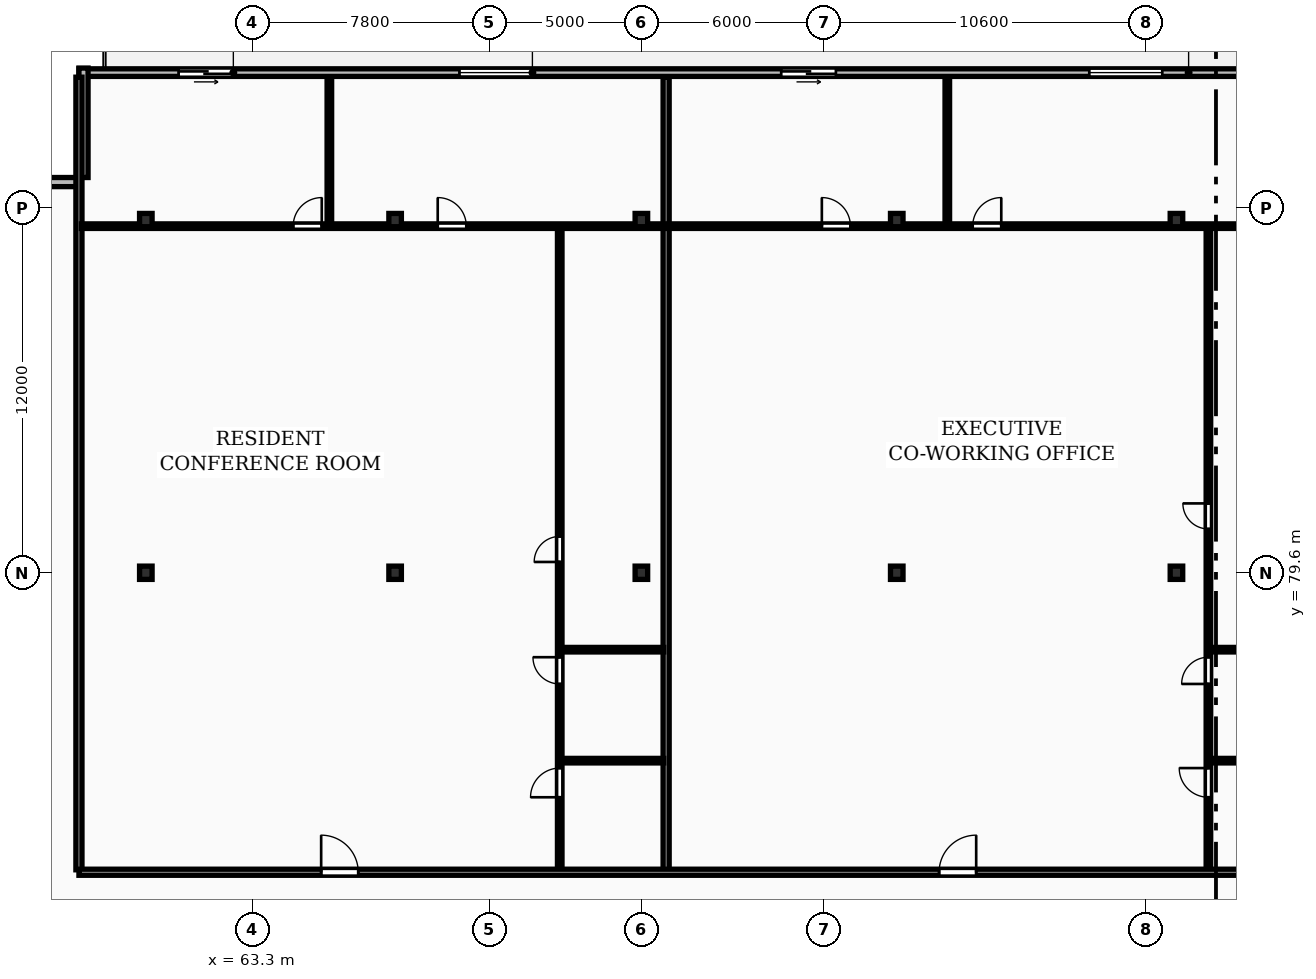
"""IFC4 building model, lengths in metres.
Left out: names, types, materials, properties, quantities, classifications, styles, units other than length and angle.
Written with IfcOpenShell. Run it as: python <this file> out.ifc"""

import sys

from ifc_helpers import new_model, si_unit, direction, frame, frame_2d, origin, origin_2d, place, context, subcontext, project, spatial, rectangle, i_section, extrude, element, fill, save


model = new_model("IFC4")
c1 = context("Model", 3, precision=1e-05, world=origin(), true_north=direction((0.0, 1.0)))
c2 = subcontext(c1, "Body", "Model", "MODEL_VIEW")
j1 = project(units=[si_unit("LENGTHUNIT", "METRE"), si_unit("PLANEANGLEUNIT", "RADIAN")], contexts=[c1])
p1 = place(None, origin())
s1 = spatial("IfcSite", under=j1, at=p1, CompositionType="ELEMENT")
p2 = place(p1, origin())
s2 = spatial("IfcBuilding", under=s1, at=p2, CompositionType="ELEMENT")
p3 = place(p2, frame((0.0, 0.0, 146.5)))
s3 = spatial("IfcBuildingStorey", under=s2, at=p3, CompositionType="ELEMENT", Elevation=146.5)
for number, where, z_axis, x_axis in (
    (1, (59.8, 79.6, 0.0), (0.0, 0.0, 1.0), (1.0, 0.0, 0.0)),
    (2, (59.8, 91.2, 0.0), (0.0, 0.0, 1.0), (1.0, 0.0, 0.0)),
    (3, (68.0, 79.6, 0.0), (0.0, 0.0, 1.0), (1.0, 0.0, 0.0)),
    (4, (68.0, 91.2, 0.0), (0.0, 0.0, 1.0), (1.0, 0.0, 0.0)),
    (5, (76.1, 79.6, 0.0), (0.0, 0.0, 1.0), (1.0, 0.0, 0.0)),
    (6, (76.1, 91.2, 0.0), (0.0, 0.0, 1.0), (1.0, 0.0, 0.0)),
    (7, (84.5, 79.6, 0.0), (0.0, 0.0, 1.0), (1.0, 0.0, 0.0)),
    (8, (84.5, 91.2, 0.0), (0.0, 0.0, 1.0), (1.0, 0.0, 0.0)),
    (9, (93.7, 79.6, 0.0), (0.0, 0.0, 1.0), (1.0, 0.0, 0.0)),
    (10, (93.7, 91.2, 0.0), (0.0, 0.0, 1.0), (1.0, 0.0, 0.0)),
):
    element("IfcColumn", number, at=place(p3, frame(where, z_axis=z_axis, x_axis=x_axis)), inside=s3, PredefinedType="COLUMN", context=c2, shape_type="SweptSolid", body=[
        extrude(i_section(OverallWidth=0.412, OverallDepth=0.437, WebThickness=0.036, FlangeThickness=0.052, FilletRadius=0.015, at=origin_2d()), origin(), (0.0, 0.0, 1.0), 3.6),
    ])
p4 = place(p3, frame((130.6, 96.05, 0.0), z_axis=(0.0, 0.0, 1.0), x_axis=(-1.0, 0.0, 0.0)))
e11 = element("IfcWall", 11, at=p4, inside=s3, PredefinedType="STANDARD", context=c2, shape_type="SweptSolid", body=[
    extrude(rectangle(XDim=73.0, YDim=0.25, at=frame_2d((36.5, 0.0))), origin(), (0.0, 0.0, 1.0), 3.31),
])
p5 = place(p4, frame((67.921, 0.0, 0.0)))
e12 = element("IfcOpeningElement", 12, at=p5, cuts=e11, PredefinedType="OPENING", context=c2, shape_type="SweptSolid", body=[
    extrude(rectangle(XDim=1.8, YDim=2.2, at=frame_2d((0.9, 1.1))), frame((0.0, 0.135, 0.0), z_axis=(0.0, -1.0, 0.0), x_axis=(1.0, 0.0, 0.0)), (0.0, 0.0, 1.0), 0.27),
])
p6 = place(p4, frame((58.084, 0.0, 0.85)))
e13 = element("IfcOpeningElement", 13, at=p6, cuts=e11, PredefinedType="OPENING", context=c2, shape_type="SweptSolid", body=[
    extrude(rectangle(XDim=2.4, YDim=1.9, at=frame_2d((1.2, 0.95))), frame((0.0, 0.135, 0.0), z_axis=(0.0, -1.0, 0.0), x_axis=(1.0, 0.0, 0.0)), (0.0, 0.0, 1.0), 0.27),
])
p7 = place(p4, frame((48.101, 0.0, 0.0)))
e14 = element("IfcOpeningElement", 14, at=p7, cuts=e11, PredefinedType="OPENING", context=c2, shape_type="SweptSolid", body=[
    extrude(rectangle(XDim=1.8, YDim=2.2, at=frame_2d((0.9, 1.1))), frame((0.0, 0.135, 0.0), z_axis=(0.0, -1.0, 0.0), x_axis=(1.0, 0.0, 0.0)), (0.0, 0.0, 1.0), 0.27),
])
p8 = place(p4, frame((37.368, 0.0, 0.85)))
e15 = element("IfcOpeningElement", 15, at=p8, cuts=e11, PredefinedType="OPENING", context=c2, shape_type="SweptSolid", body=[
    extrude(rectangle(XDim=2.4, YDim=1.9, at=frame_2d((1.2, 0.95))), frame((0.0, 0.135, 0.0), z_axis=(0.0, -1.0, 0.0), x_axis=(1.0, 0.0, 0.0)), (0.0, 0.0, 1.0), 0.27),
])
p9 = place(p4, frame((22.445, 0.0, 0.85)))
e16 = element("IfcOpeningElement", 16, at=p9, cuts=e11, PredefinedType="OPENING", context=c2, shape_type="SweptSolid", body=[
    extrude(rectangle(XDim=2.4, YDim=1.9, at=frame_2d((1.2, 0.95))), frame((0.0, 0.135, 0.0), z_axis=(0.0, -1.0, 0.0), x_axis=(1.0, 0.0, 0.0)), (0.0, 0.0, 1.0), 0.27),
])
p10 = place(p4, frame((17.845, 0.0, 0.85)))
e17 = element("IfcOpeningElement", 17, at=p10, cuts=e11, PredefinedType="OPENING", context=c2, shape_type="SweptSolid", body=[
    extrude(rectangle(XDim=2.4, YDim=1.9, at=frame_2d((1.2, 0.95))), frame((0.0, 0.135, 0.0), z_axis=(0.0, -1.0, 0.0), x_axis=(1.0, 0.0, 0.0)), (0.0, 0.0, 1.0), 0.27),
])
p11 = place(p4, frame((28.239, 0.0, 0.0)))
e18 = element("IfcOpeningElement", 18, at=p11, cuts=e11, PredefinedType="OPENING", context=c2, shape_type="SweptSolid", body=[
    extrude(rectangle(XDim=1.8, YDim=2.2, at=frame_2d((0.9, 1.1))), frame((0.0, 0.135, 0.0), z_axis=(0.0, -1.0, 0.0), x_axis=(1.0, 0.0, 0.0)), (0.0, 0.0, 1.0), 0.27),
])
p12 = place(p4, frame((14.599, 0.0, 0.85)))
e19 = element("IfcOpeningElement", 19, at=p12, cuts=e11, PredefinedType="OPENING", context=c2, shape_type="SweptSolid", body=[
    extrude(rectangle(XDim=1.8, YDim=1.8, at=frame_2d((0.9, 0.9))), frame((0.0, 0.135, 0.0), z_axis=(0.0, -1.0, 0.0), x_axis=(1.0, 0.0, 0.0)), (0.0, 0.0, 1.0), 0.27),
])
p13 = place(p4, frame((8.234, 0.0, 0.0)))
e20 = element("IfcOpeningElement", 20, at=p13, cuts=e11, PredefinedType="OPENING", context=c2, shape_type="SweptSolid", body=[
    extrude(rectangle(XDim=1.8, YDim=2.2, at=frame_2d((0.9, 1.1))), frame((0.0, 0.135, 0.0), z_axis=(0.0, -1.0, 0.0), x_axis=(1.0, 0.0, 0.0)), (0.0, 0.0, 1.0), 0.27),
])
p14 = place(p4, frame((0.9, 0.0, 0.85)))
e21 = element("IfcOpeningElement", 21, at=p14, cuts=e11, PredefinedType="OPENING", context=c2, shape_type="SweptSolid", body=[
    extrude(rectangle(XDim=2.4, YDim=1.9, at=frame_2d((1.2, 0.95))), frame((0.0, 0.135, 0.0), z_axis=(0.0, -1.0, 0.0), x_axis=(1.0, 0.0, 0.0)), (0.0, 0.0, 1.0), 0.27),
])
p15 = place(p3, frame((57.75, 96.2, 0.0), z_axis=(0.0, 0.0, 1.0), x_axis=(0.0, -1.0, 0.0)))
e22 = element("IfcWall", 22, at=p15, inside=s3, PredefinedType="STANDARD", context=c2, shape_type="SweptSolid", body=[
    extrude(rectangle(XDim=3.6, YDim=0.3, at=frame_2d((1.8, 0.0))), origin(), (0.0, 0.0, 1.0), 3.31),
])
p16 = place(p3, frame((57.6, 92.45, 0.0), z_axis=(0.0, 0.0, 1.0), x_axis=(-1.0, 0.0, 0.0)))
e23 = element("IfcWall", 23, at=p16, inside=s3, PredefinedType="STANDARD", context=c2, shape_type="SweptSolid", body=[
    extrude(rectangle(XDim=3.6, YDim=0.3, at=frame_2d((1.8, 0.0))), origin(), (0.0, 0.0, 1.0), 3.31),
])
for number, where, z_axis, x_axis in (
    (24, (57.6, 69.83, 0.0), (0.0, 0.0, 1.0), (0.0, 1.0, 0.0)),
    (25, (76.914, 69.83, 0.0), (0.0, 0.0, 1.0), (0.0, 1.0, 0.0)),
):
    element("IfcWall", number, at=place(p3, frame(where, z_axis=z_axis, x_axis=x_axis)), inside=s3, PredefinedType="PARTITIONING", context=c2, shape_type="SweptSolid", body=[
        extrude(rectangle(XDim=26.07, YDim=0.2, at=frame_2d((13.035, 0.0))), origin(), (0.0, 0.0, 1.0), 3.31),
    ])
for number, where, z_axis, x_axis in (
    (26, (73.474, 73.42, 0.0), (0.0, 0.0, 1.0), (1.0, 0.0, 0.0)),
    (27, (73.474, 77.07, 0.0), (0.0, 0.0, 1.0), (1.0, 0.0, 0.0)),
):
    element("IfcWall", number, at=place(p3, frame(where, z_axis=z_axis, x_axis=x_axis)), inside=s3, PredefinedType="PARTITIONING", context=c2, shape_type="SweptSolid", body=[
        extrude(rectangle(XDim=3.36, YDim=0.15, at=frame_2d((1.68, 0.0))), origin(), (0.0, 0.0, 1.0), 3.31),
    ])
p17 = place(p3, frame((73.414, 69.81, 0.0), z_axis=(0.0, 0.0, 1.0), x_axis=(0.0, 1.0, 0.0)))
e28 = element("IfcWall", 28, at=p17, inside=s3, PredefinedType="PARTITIONING", context=c2, shape_type="SweptSolid", body=[
    extrude(rectangle(XDim=21.13, YDim=0.15, at=frame_2d((10.565, 0.0))), origin(), (0.0, 0.0, 1.0), 3.31),
])
p18 = place(p17, frame((2.406, 0.0, 0.0)))
e29 = element("IfcOpeningElement", 29, at=p18, cuts=e28, PredefinedType="OPENING", context=c2, shape_type="SweptSolid", body=[
    extrude(rectangle(XDim=0.96, YDim=2.1, at=frame_2d((0.48, 1.05))), frame((0.0, 0.085, 0.0), z_axis=(0.0, -1.0, 0.0), x_axis=(1.0, 0.0, 0.0)), (0.0, 0.0, 1.0), 0.17),
])
p19 = place(p17, frame((6.133, 0.0, 0.0)))
e30 = element("IfcOpeningElement", 30, at=p19, cuts=e28, PredefinedType="OPENING", context=c2, shape_type="SweptSolid", body=[
    extrude(rectangle(XDim=0.88, YDim=2.06, at=frame_2d((0.44, 1.03))), frame((0.0, 0.085, 0.0), z_axis=(0.0, -1.0, 0.0), x_axis=(1.0, 0.0, 0.0)), (0.0, 0.0, 1.0), 0.17),
])
p20 = place(p17, frame((10.145, 0.0, 0.0)))
e31 = element("IfcOpeningElement", 31, at=p20, cuts=e28, PredefinedType="OPENING", context=c2, shape_type="SweptSolid", body=[
    extrude(rectangle(XDim=0.84, YDim=2.04, at=frame_2d((0.42, 1.02))), frame((0.0, 0.085, 0.0), z_axis=(0.0, -1.0, 0.0), x_axis=(1.0, 0.0, 0.0)), (0.0, 0.0, 1.0), 0.17),
])
p21 = place(p3, frame((65.837, 91.08, 0.0), z_axis=(0.0, 0.0, 1.0), x_axis=(0.0, 1.0, 0.0)))
e32 = element("IfcWall", 32, at=p21, inside=s3, PredefinedType="PARTITIONING", context=c2, shape_type="SweptSolid", body=[
    extrude(rectangle(XDim=4.82, YDim=0.15, at=frame_2d((2.41, 0.0))), origin(), (0.0, 0.0, 1.0), 3.31),
])
p22 = place(p3, frame((57.68, 91.0, 0.0), z_axis=(0.0, 0.0, 1.0), x_axis=(1.0, 0.0, 0.0)))
e33 = element("IfcWall", 33, at=p22, inside=s3, PredefinedType="PARTITIONING", context=c2, shape_type="SweptSolid", body=[
    extrude(rectangle(XDim=19.154, YDim=0.15, at=frame_2d((9.577, 0.0))), origin(), (0.0, 0.0, 1.0), 3.003),
])
p23 = place(p22, frame((6.967, 0.0, 0.0)))
e34 = element("IfcOpeningElement", 34, at=p23, cuts=e33, PredefinedType="OPENING", context=c2, shape_type="SweptSolid", body=[
    extrude(rectangle(XDim=0.94, YDim=2.1, at=frame_2d((0.47, 1.05))), frame((0.0, 0.085, 0.0), z_axis=(0.0, -1.0, 0.0), x_axis=(1.0, 0.0, 0.0)), (0.0, 0.0, 1.0), 0.17),
])
p24 = place(p22, frame((11.721, 0.0, 0.0)))
e35 = element("IfcOpeningElement", 35, at=p24, cuts=e33, PredefinedType="OPENING", context=c2, shape_type="SweptSolid", body=[
    extrude(rectangle(XDim=0.94, YDim=2.1, at=frame_2d((0.47, 1.05))), frame((0.0, 0.085, 0.0), z_axis=(0.0, -1.0, 0.0), x_axis=(1.0, 0.0, 0.0)), (0.0, 0.0, 1.0), 0.17),
])
for number, where, z_axis, x_axis in (
    (36, (94.811, 73.42, 0.0), (0.0, 0.0, 1.0), (1.0, 0.0, 0.0)),
    (37, (94.811, 77.07, 0.0), (0.0, 0.0, 1.0), (1.0, 0.0, 0.0)),
):
    element("IfcWall", number, at=place(p3, frame(where, z_axis=z_axis, x_axis=x_axis)), inside=s3, PredefinedType="PARTITIONING", context=c2, shape_type="SweptSolid", body=[
        extrude(rectangle(XDim=3.13, YDim=0.15, at=frame_2d((1.565, 0.0))), origin(), (0.0, 0.0, 1.0), 3.31),
    ])
p25 = place(p3, frame((94.751, 69.81, 0.0), z_axis=(0.0, 0.0, 1.0), x_axis=(0.0, 1.0, 0.0)))
e38 = element("IfcWall", 38, at=p25, inside=s3, PredefinedType="PARTITIONING", context=c2, shape_type="SweptSolid", body=[
    extrude(rectangle(XDim=21.13, YDim=0.15, at=frame_2d((10.565, 0.0))), origin(), (0.0, 0.0, 1.0), 3.31),
])
p26 = place(p25, frame((2.406, 0.0, 0.0)))
e39 = element("IfcOpeningElement", 39, at=p26, cuts=e38, PredefinedType="OPENING", context=c2, shape_type="SweptSolid", body=[
    extrude(rectangle(XDim=0.96, YDim=2.1, at=frame_2d((0.48, 1.05))), frame((0.0, 0.085, 0.0), z_axis=(0.0, -1.0, 0.0), x_axis=(1.0, 0.0, 0.0)), (0.0, 0.0, 1.0), 0.17),
])
p27 = place(p25, frame((6.133, 0.0, 0.0)))
e40 = element("IfcOpeningElement", 40, at=p27, cuts=e38, PredefinedType="OPENING", context=c2, shape_type="SweptSolid", body=[
    extrude(rectangle(XDim=0.88, YDim=2.06, at=frame_2d((0.44, 1.03))), frame((0.0, 0.085, 0.0), z_axis=(0.0, -1.0, 0.0), x_axis=(1.0, 0.0, 0.0)), (0.0, 0.0, 1.0), 0.17),
])
p28 = place(p25, frame((11.231, 0.0, 0.0)))
e41 = element("IfcOpeningElement", 41, at=p28, cuts=e38, PredefinedType="OPENING", context=c2, shape_type="SweptSolid", body=[
    extrude(rectangle(XDim=0.84, YDim=2.04, at=frame_2d((0.42, 1.02))), frame((0.0, 0.085, 0.0), z_axis=(0.0, -1.0, 0.0), x_axis=(1.0, 0.0, 0.0)), (0.0, 0.0, 1.0), 0.17),
])
p29 = place(p3, frame((86.163, 91.08, 0.0), z_axis=(0.0, 0.0, 1.0), x_axis=(0.0, 1.0, 0.0)))
e42 = element("IfcWall", 42, at=p29, inside=s3, PredefinedType="PARTITIONING", context=c2, shape_type="SweptSolid", body=[
    extrude(rectangle(XDim=4.82, YDim=0.15, at=frame_2d((2.41, 0.0))), origin(), (0.0, 0.0, 1.0), 3.31),
])
p30 = place(p3, frame((76.994, 91.0, 0.0), z_axis=(0.0, 0.0, 1.0), x_axis=(1.0, 0.0, 0.0)))
e43 = element("IfcWall", 43, at=p30, inside=s3, PredefinedType="PARTITIONING", context=c2, shape_type="SweptSolid", body=[
    extrude(rectangle(XDim=20.947, YDim=0.15, at=frame_2d((10.474, 0.0))), origin(), (0.0, 0.0, 1.0), 3.003),
])
p31 = place(p30, frame((5.042, 0.0, 0.0)))
e44 = element("IfcOpeningElement", 44, at=p31, cuts=e43, PredefinedType="OPENING", context=c2, shape_type="SweptSolid", body=[
    extrude(rectangle(XDim=0.94, YDim=2.1, at=frame_2d((0.47, 1.05))), frame((0.0, 0.085, 0.0), z_axis=(0.0, -1.0, 0.0), x_axis=(1.0, 0.0, 0.0)), (0.0, 0.0, 1.0), 0.17),
])
p32 = place(p30, frame((10.004, 0.0, 0.0)))
e45 = element("IfcOpeningElement", 45, at=p32, cuts=e43, PredefinedType="OPENING", context=c2, shape_type="SweptSolid", body=[
    extrude(rectangle(XDim=0.94, YDim=2.1, at=frame_2d((0.47, 1.05))), frame((0.0, 0.085, 0.0), z_axis=(0.0, -1.0, 0.0), x_axis=(1.0, 0.0, 0.0)), (0.0, 0.0, 1.0), 0.17),
])
p33 = place(p3, frame((57.6, 69.75, 0.0), z_axis=(0.0, 0.0, 1.0), x_axis=(1.0, 0.0, 0.0)))
e46 = element("IfcWall", 46, at=p33, inside=s3, PredefinedType="PARTITIONING", context=c2, shape_type="SweptSolid", body=[
    extrude(rectangle(XDim=73.0, YDim=0.2, at=frame_2d((36.5, 0.0))), origin(), (0.0, 0.0, 1.0), 3.31),
])
p34 = place(p33, frame((7.967, 0.0, 0.0)))
e47 = element("IfcOpeningElement", 47, at=p34, cuts=e46, PredefinedType="OPENING", context=c2, shape_type="SweptSolid", body=[
    extrude(rectangle(XDim=1.22, YDim=2.18, at=frame_2d((0.61, 1.09))), frame((0.0, 0.11, 0.0), z_axis=(0.0, -1.0, 0.0), x_axis=(1.0, 0.0, 0.0)), (0.0, 0.0, 1.0), 0.22),
])
p35 = place(p33, frame((28.293, 0.0, 0.0)))
e48 = element("IfcOpeningElement", 48, at=p35, cuts=e46, PredefinedType="OPENING", context=c2, shape_type="SweptSolid", body=[
    extrude(rectangle(XDim=1.22, YDim=2.18, at=frame_2d((0.61, 1.09))), frame((0.0, 0.11, 0.0), z_axis=(0.0, -1.0, 0.0), x_axis=(1.0, 0.0, 0.0)), (0.0, 0.0, 1.0), 0.22),
])
p36 = place(p33, frame((42.466, 0.0, 0.0)))
e49 = element("IfcOpeningElement", 49, at=p36, cuts=e46, PredefinedType="OPENING", context=c2, shape_type="SweptSolid", body=[
    extrude(rectangle(XDim=0.95, YDim=2.15, at=frame_2d((0.475, 1.075))), frame((0.0, 0.11, 0.0), z_axis=(0.0, -1.0, 0.0), x_axis=(1.0, 0.0, 0.0)), (0.0, 0.0, 1.0), 0.22),
])
p37 = place(p33, frame((60.738, 0.0, 0.0)))
e50 = element("IfcOpeningElement", 50, at=p37, cuts=e46, PredefinedType="OPENING", context=c2, shape_type="SweptSolid", body=[
    extrude(rectangle(XDim=0.95, YDim=2.15, at=frame_2d((0.475, 1.075))), frame((0.0, 0.11, 0.0), z_axis=(0.0, -1.0, 0.0), x_axis=(1.0, 0.0, 0.0)), (0.0, 0.0, 1.0), 0.22),
])
p38 = place(p5, origin())
e51 = element("IfcDoor", 51, at=p38, inside=s3, OperationType="SLIDING_TO_LEFT", PredefinedType="DOOR", context=c2, shape_type="SweptSolid", body=[
    extrude(rectangle(XDim=1.8, YDim=2.2, at=frame_2d((0.9, 1.1))), frame((0.0, 0.025, 0.0), z_axis=(0.0, -1.0, 0.0), x_axis=(1.0, 0.0, 0.0)), (0.0, 0.0, 1.0), 0.05),
])
fill(e12, e51)
p39 = place(p6, origin())
e52 = element("IfcWindow", 52, at=p39, inside=s3, PartitioningType="DOUBLE_PANEL_VERTICAL", PredefinedType="WINDOW", context=c2, shape_type="SweptSolid", body=[
    extrude(rectangle(XDim=2.4, YDim=1.9, at=frame_2d((1.2, 0.95))), frame((0.0, 0.03, 0.0), z_axis=(0.0, -1.0, 0.0), x_axis=(1.0, 0.0, 0.0)), (0.0, 0.0, 1.0), 0.06),
])
fill(e13, e52)
p40 = place(p7, origin())
e53 = element("IfcDoor", 53, at=p40, inside=s3, OperationType="SLIDING_TO_LEFT", PredefinedType="DOOR", context=c2, shape_type="SweptSolid", body=[
    extrude(rectangle(XDim=1.8, YDim=2.2, at=frame_2d((0.9, 1.1))), frame((0.0, 0.025, 0.0), z_axis=(0.0, -1.0, 0.0), x_axis=(1.0, 0.0, 0.0)), (0.0, 0.0, 1.0), 0.05),
])
fill(e14, e53)
p41 = place(p8, origin())
e54 = element("IfcWindow", 54, at=p41, inside=s3, PartitioningType="DOUBLE_PANEL_VERTICAL", PredefinedType="WINDOW", context=c2, shape_type="SweptSolid", body=[
    extrude(rectangle(XDim=2.4, YDim=1.9, at=frame_2d((1.2, 0.95))), frame((0.0, 0.03, 0.0), z_axis=(0.0, -1.0, 0.0), x_axis=(1.0, 0.0, 0.0)), (0.0, 0.0, 1.0), 0.06),
])
fill(e15, e54)
p42 = place(p18, origin())
e55 = element("IfcDoor", 55, at=p42, inside=s3, OperationType="SINGLE_SWING_LEFT", PredefinedType="DOOR", context=c2, shape_type="SweptSolid", body=[
    extrude(rectangle(XDim=0.96, YDim=2.1, at=frame_2d((0.48, 1.05))), frame((0.0, 0.025, 0.0), z_axis=(0.0, -1.0, 0.0), x_axis=(1.0, 0.0, 0.0)), (0.0, 0.0, 1.0), 0.05),
])
fill(e29, e55)
p43 = place(p19, origin())
e56 = element("IfcDoor", 56, at=p43, inside=s3, OperationType="SINGLE_SWING_RIGHT", PredefinedType="DOOR", context=c2, shape_type="SweptSolid", body=[
    extrude(rectangle(XDim=0.88, YDim=2.06, at=frame_2d((0.44, 1.03))), frame((0.0, 0.025, 0.0), z_axis=(0.0, -1.0, 0.0), x_axis=(1.0, 0.0, 0.0)), (0.0, 0.0, 1.0), 0.05),
])
fill(e30, e56)
p44 = place(p20, origin())
e57 = element("IfcDoor", 57, at=p44, inside=s3, OperationType="SINGLE_SWING_LEFT", PredefinedType="DOOR", context=c2, shape_type="SweptSolid", body=[
    extrude(rectangle(XDim=0.84, YDim=2.04, at=frame_2d((0.42, 1.02))), frame((0.0, 0.025, 0.0), z_axis=(0.0, -1.0, 0.0), x_axis=(1.0, 0.0, 0.0)), (0.0, 0.0, 1.0), 0.05),
])
fill(e31, e57)
p45 = place(p23, origin())
e58 = element("IfcDoor", 58, at=p45, inside=s3, OperationType="SINGLE_SWING_RIGHT", PredefinedType="DOOR", context=c2, shape_type="SweptSolid", body=[
    extrude(rectangle(XDim=0.94, YDim=2.1, at=frame_2d((0.47, 1.05))), frame((0.0, 0.025, 0.0), z_axis=(0.0, -1.0, 0.0), x_axis=(1.0, 0.0, 0.0)), (0.0, 0.0, 1.0), 0.05),
])
fill(e34, e58)
p46 = place(p24, origin())
e59 = element("IfcDoor", 59, at=p46, inside=s3, OperationType="SINGLE_SWING_LEFT", PredefinedType="DOOR", context=c2, shape_type="SweptSolid", body=[
    extrude(rectangle(XDim=0.94, YDim=2.1, at=frame_2d((0.47, 1.05))), frame((0.0, 0.025, 0.0), z_axis=(0.0, -1.0, 0.0), x_axis=(1.0, 0.0, 0.0)), (0.0, 0.0, 1.0), 0.05),
])
fill(e35, e59)
p47 = place(p26, origin())
e60 = element("IfcDoor", 60, at=p47, inside=s3, OperationType="SINGLE_SWING_RIGHT", PredefinedType="DOOR", context=c2, shape_type="SweptSolid", body=[
    extrude(rectangle(XDim=0.96, YDim=2.1, at=frame_2d((0.48, 1.05))), frame((0.0, 0.025, 0.0), z_axis=(0.0, -1.0, 0.0), x_axis=(1.0, 0.0, 0.0)), (0.0, 0.0, 1.0), 0.05),
])
fill(e39, e60)
p48 = place(p27, origin())
e61 = element("IfcDoor", 61, at=p48, inside=s3, OperationType="SINGLE_SWING_LEFT", PredefinedType="DOOR", context=c2, shape_type="SweptSolid", body=[
    extrude(rectangle(XDim=0.88, YDim=2.06, at=frame_2d((0.44, 1.03))), frame((0.0, 0.025, 0.0), z_axis=(0.0, -1.0, 0.0), x_axis=(1.0, 0.0, 0.0)), (0.0, 0.0, 1.0), 0.05),
])
fill(e40, e61)
p49 = place(p28, origin())
e62 = element("IfcDoor", 62, at=p49, inside=s3, OperationType="SINGLE_SWING_RIGHT", PredefinedType="DOOR", context=c2, shape_type="SweptSolid", body=[
    extrude(rectangle(XDim=0.84, YDim=2.04, at=frame_2d((0.42, 1.02))), frame((0.0, 0.025, 0.0), z_axis=(0.0, -1.0, 0.0), x_axis=(1.0, 0.0, 0.0)), (0.0, 0.0, 1.0), 0.05),
])
fill(e41, e62)
p50 = place(p31, origin())
e63 = element("IfcDoor", 63, at=p50, inside=s3, OperationType="SINGLE_SWING_LEFT", PredefinedType="DOOR", context=c2, shape_type="SweptSolid", body=[
    extrude(rectangle(XDim=0.94, YDim=2.1, at=frame_2d((0.47, 1.05))), frame((0.0, 0.025, 0.0), z_axis=(0.0, -1.0, 0.0), x_axis=(1.0, 0.0, 0.0)), (0.0, 0.0, 1.0), 0.05),
])
fill(e44, e63)
p51 = place(p32, origin())
e64 = element("IfcDoor", 64, at=p51, inside=s3, OperationType="SINGLE_SWING_RIGHT", PredefinedType="DOOR", context=c2, shape_type="SweptSolid", body=[
    extrude(rectangle(XDim=0.94, YDim=2.1, at=frame_2d((0.47, 1.05))), frame((0.0, 0.025, 0.0), z_axis=(0.0, -1.0, 0.0), x_axis=(1.0, 0.0, 0.0)), (0.0, 0.0, 1.0), 0.05),
])
fill(e45, e64)
p52 = place(p34, origin())
e65 = element("IfcDoor", 65, at=p52, inside=s3, OperationType="SINGLE_SWING_LEFT", PredefinedType="DOOR", context=c2, shape_type="SweptSolid", body=[
    extrude(rectangle(XDim=1.22, YDim=2.18, at=frame_2d((0.61, 1.09))), frame((0.0, 0.025, 0.0), z_axis=(0.0, -1.0, 0.0), x_axis=(1.0, 0.0, 0.0)), (0.0, 0.0, 1.0), 0.05),
])
fill(e47, e65)
p53 = place(p35, origin())
e66 = element("IfcDoor", 66, at=p53, inside=s3, OperationType="SINGLE_SWING_RIGHT", PredefinedType="DOOR", context=c2, shape_type="SweptSolid", body=[
    extrude(rectangle(XDim=1.22, YDim=2.18, at=frame_2d((0.61, 1.09))), frame((0.0, 0.025, 0.0), z_axis=(0.0, -1.0, 0.0), x_axis=(1.0, 0.0, 0.0)), (0.0, 0.0, 1.0), 0.05),
])
fill(e48, e66)
save(model, sys.argv[1])
